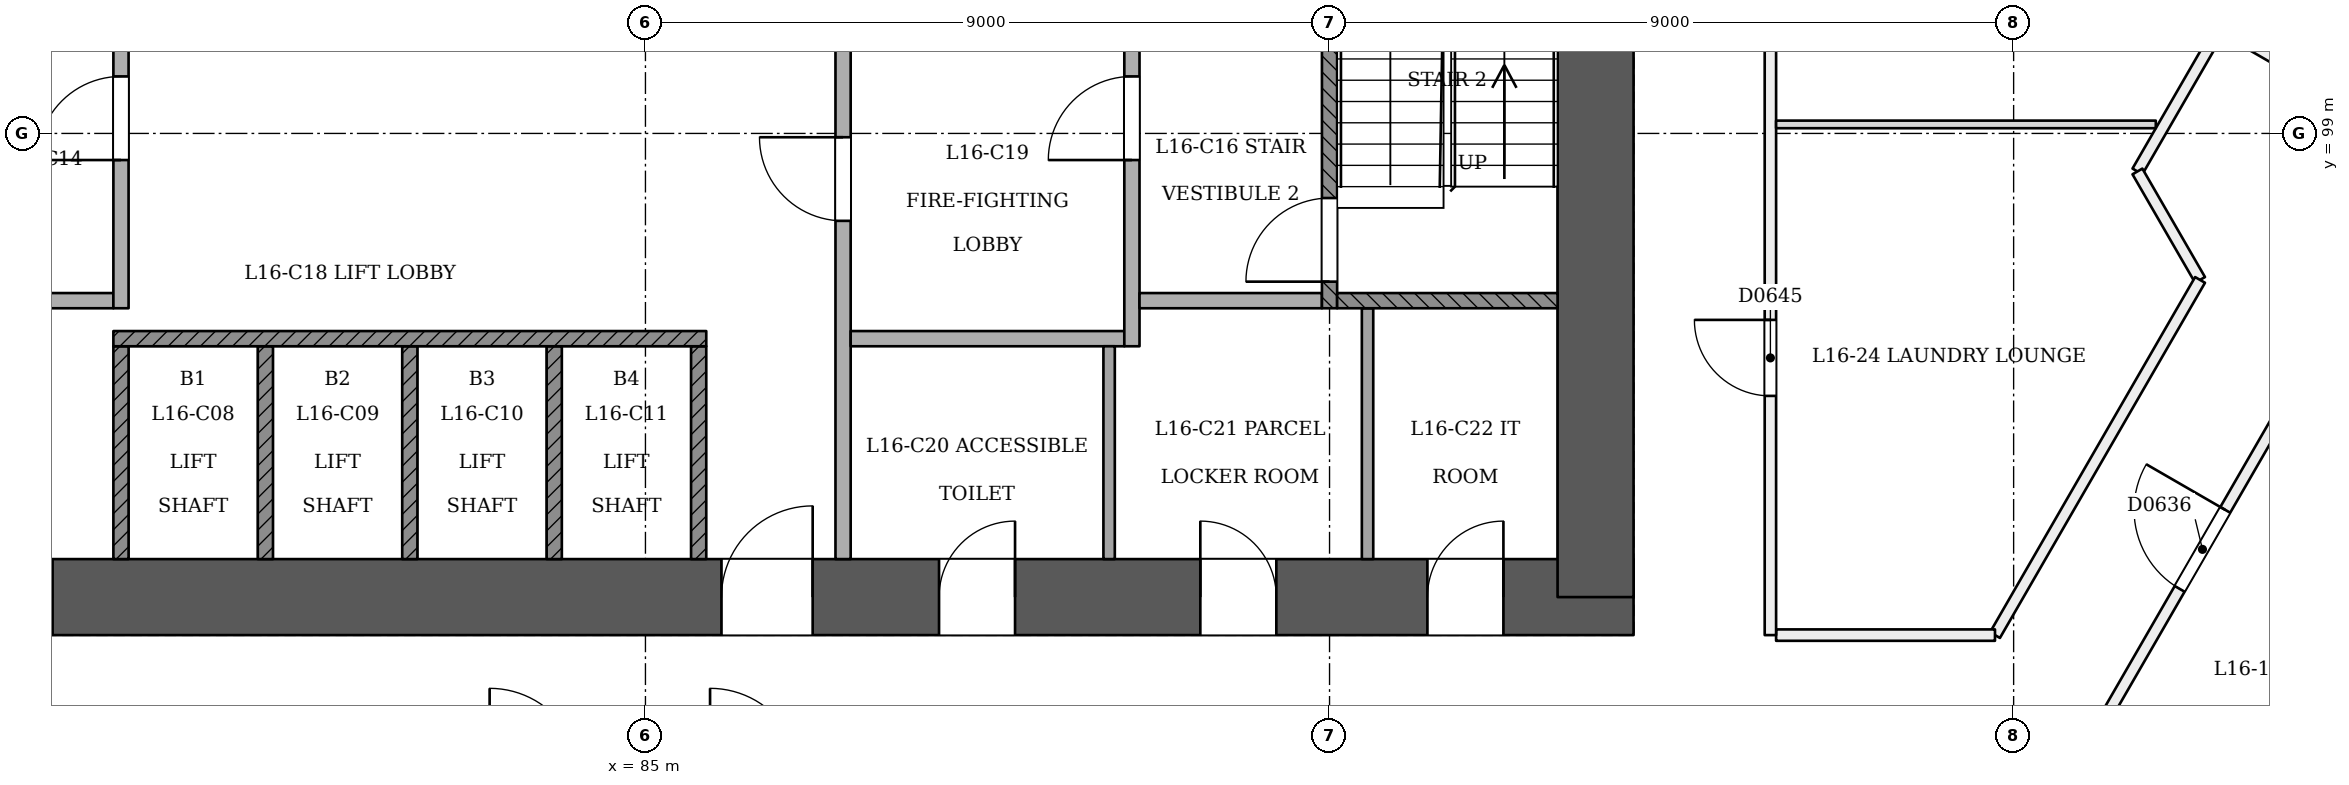
"""IFC4 building model, lengths in metres.
Left out: names, types, materials, properties, quantities, classifications, styles, units other than length and angle.
Written with IfcOpenShell. Run it as: python <this file> out.ifc"""

import sys

from ifc_helpers import new_model, si_unit, direction, frame, frame_2d, origin, place, context, subcontext, project, spatial, rectangle, extrude, element, fill, save


model = new_model("IFC4")
c1 = context("Model", 3, precision=1e-05, world=origin(), true_north=direction((0.0, 1.0)))
c2 = subcontext(c1, "Body", "Model", "MODEL_VIEW")
j1 = project(units=[si_unit("LENGTHUNIT", "METRE"), si_unit("PLANEANGLEUNIT", "RADIAN")], contexts=[c1])
p1 = place(None, origin())
s1 = spatial("IfcSite", under=j1, at=p1, CompositionType="ELEMENT")
p2 = place(p1, origin())
s2 = spatial("IfcBuilding", under=s1, at=p2, CompositionType="ELEMENT")
p3 = place(p2, frame((0.0, 0.0, 66.6)))
s3 = spatial("IfcBuildingStorey", under=s2, at=p3, CompositionType="ELEMENT", Elevation=66.6)
p4 = place(p3, frame((72.5, 92.9, 0.0), z_axis=(0.0, 0.0, 1.0), x_axis=(1.0, 0.0, 0.0)))
e1 = element("IfcWall", 1, at=p4, inside=s3, PredefinedType="SHEAR", context=c2, shape_type="SweptSolid", body=[
    extrude(rectangle(XDim=25.5, YDim=1.0, at=frame_2d((12.75, 0.0))), origin(), (0.0, 0.0, 1.0), 3.6),
])
p5 = place(p4, frame((1.3, 0.0, 0.0)))
e2 = element("IfcOpeningElement", 2, at=p5, cuts=e1, PredefinedType="OPENING", context=c2, shape_type="SweptSolid", body=[
    extrude(rectangle(XDim=1.2, YDim=2.1, at=frame_2d((0.6, 1.05))), frame((0.0, 0.51, 0.0), z_axis=(0.0, -1.0, 0.0), x_axis=(1.0, 0.0, 0.0)), (0.0, 0.0, 1.0), 1.021),
])
p6 = place(p4, frame((3.5, 0.0, 0.0)))
e3 = element("IfcOpeningElement", 3, at=p6, cuts=e1, PredefinedType="OPENING", context=c2, shape_type="SweptSolid", body=[
    extrude(rectangle(XDim=1.2, YDim=2.1, at=frame_2d((0.6, 1.05))), frame((0.0, 0.51, 0.0), z_axis=(0.0, -1.0, 0.0), x_axis=(1.0, 0.0, 0.0)), (0.0, 0.0, 1.0), 1.021),
])
p7 = place(p4, frame((13.5, 0.0, 0.0)))
e4 = element("IfcOpeningElement", 4, at=p7, cuts=e1, PredefinedType="OPENING", context=c2, shape_type="SweptSolid", body=[
    extrude(rectangle(XDim=1.2, YDim=2.1, at=frame_2d((0.6, 1.05))), frame((0.0, 0.51, 0.0), z_axis=(0.0, -1.0, 0.0), x_axis=(1.0, 0.0, 0.0)), (0.0, 0.0, 1.0), 1.021),
])
p8 = place(p4, frame((16.363, 0.0, 0.0)))
e5 = element("IfcOpeningElement", 5, at=p8, cuts=e1, PredefinedType="OPENING", context=c2, shape_type="SweptSolid", body=[
    extrude(rectangle(XDim=1.0, YDim=2.1, at=frame_2d((0.5, 1.05))), frame((0.0, 0.51, 0.0), z_axis=(0.0, -1.0, 0.0), x_axis=(1.0, 0.0, 0.0)), (0.0, 0.0, 1.0), 1.021),
])
p9 = place(p4, frame((19.8, 0.0, 0.0)))
e6 = element("IfcOpeningElement", 6, at=p9, cuts=e1, PredefinedType="OPENING", context=c2, shape_type="SweptSolid", body=[
    extrude(rectangle(XDim=1.0, YDim=2.1, at=frame_2d((0.5, 1.05))), frame((0.0, 0.51, 0.0), z_axis=(0.0, -1.0, 0.0), x_axis=(1.0, 0.0, 0.0)), (0.0, 0.0, 1.0), 1.021),
])
p10 = place(p4, frame((22.788, 0.0, 0.0)))
e7 = element("IfcOpeningElement", 7, at=p10, cuts=e1, PredefinedType="OPENING", context=c2, shape_type="SweptSolid", body=[
    extrude(rectangle(XDim=1.0, YDim=2.1, at=frame_2d((0.5, 1.05))), frame((0.0, 0.51, 0.0), z_axis=(0.0, -1.0, 0.0), x_axis=(1.0, 0.0, 0.0)), (0.0, 0.0, 1.0), 1.021),
])
p11 = place(p3, frame((97.5, 92.9, 0.0), z_axis=(0.0, 0.0, 1.0), x_axis=(0.0, 1.0, 0.0)))
e8 = element("IfcWall", 8, at=p11, inside=s3, PredefinedType="SHEAR", context=c2, shape_type="SweptSolid", body=[
    extrude(rectangle(XDim=11.5, YDim=1.0, at=frame_2d((5.75, 0.0))), origin(), (0.0, 0.0, 1.0), 3.6),
])
p12 = place(p3, frame((62.458, 97.093, 0.0), z_axis=(0.0, 0.0, 1.0), x_axis=(0.499998802074, -0.866026095406, 0.0)))
e9 = element("IfcWall", 9, at=p12, inside=s3, PredefinedType="PARTITIONING", context=c2, shape_type="SweptSolid", body=[
    extrude(rectangle(XDim=43.437, YDim=0.15, at=frame_2d((21.719, 0.0))), origin(), (0.0, 0.0, 1.0), 2.7),
])
p13 = place(p12, frame((0.286, 0.0, 0.0)))
e10 = element("IfcOpeningElement", 10, at=p13, cuts=e9, PredefinedType="OPENING", context=c2, shape_type="SweptSolid", body=[
    extrude(rectangle(XDim=1.2, YDim=2.1, at=frame_2d((0.6, 1.05))), frame((0.0, 0.085, 0.0), z_axis=(0.0, -1.0, 0.0), x_axis=(1.0, 0.0, 0.0)), (0.0, 0.0, 1.0), 0.171),
])
p14 = place(p12, frame((12.13, 0.0, 0.0)))
e11 = element("IfcOpeningElement", 11, at=p14, cuts=e9, PredefinedType="OPENING", context=c2, shape_type="SweptSolid", body=[
    extrude(rectangle(XDim=1.2, YDim=2.1, at=frame_2d((0.6, 1.05))), frame((0.0, 0.085, 0.0), z_axis=(0.0, -1.0, 0.0), x_axis=(1.0, 0.0, 0.0)), (0.0, 0.0, 1.0), 0.171),
])
p15 = place(p12, frame((18.98, 0.0, 0.0)))
e12 = element("IfcOpeningElement", 12, at=p15, cuts=e9, PredefinedType="OPENING", context=c2, shape_type="SweptSolid", body=[
    extrude(rectangle(XDim=1.0, YDim=2.1, at=frame_2d((0.5, 1.05))), frame((0.0, 0.085, 0.0), z_axis=(0.0, -1.0, 0.0), x_axis=(1.0, 0.0, 0.0)), (0.0, 0.0, 1.0), 0.171),
])
p16 = place(p12, frame((27.88, 0.0, 0.0)))
e13 = element("IfcOpeningElement", 13, at=p16, cuts=e9, PredefinedType="OPENING", context=c2, shape_type="SweptSolid", body=[
    extrude(rectangle(XDim=1.2, YDim=2.1, at=frame_2d((0.6, 1.05))), frame((0.0, 0.085, 0.0), z_axis=(0.0, -1.0, 0.0), x_axis=(1.0, 0.0, 0.0)), (0.0, 0.0, 1.0), 0.171),
])
p17 = place(p12, frame((38.745, 0.0, 0.0)))
e14 = element("IfcOpeningElement", 14, at=p17, cuts=e9, PredefinedType="OPENING", context=c2, shape_type="SweptSolid", body=[
    extrude(rectangle(XDim=1.2, YDim=2.1, at=frame_2d((0.6, 1.05))), frame((0.0, 0.085, 0.0), z_axis=(0.0, -1.0, 0.0), x_axis=(1.0, 0.0, 0.0)), (0.0, 0.0, 1.0), 0.171),
])
p18 = place(p3, frame((85.824, 59.475, 0.0), z_axis=(0.0, 0.0, 1.0), x_axis=(0.499998498473, 0.86602627069, 0.0)))
e15 = element("IfcWall", 15, at=p18, inside=s3, PredefinedType="PARTITIONING", context=c2, shape_type="SweptSolid", body=[
    extrude(rectangle(XDim=42.924, YDim=0.15, at=frame_2d((21.462, 0.0))), origin(), (0.0, 0.0, 1.0), 2.7),
])
p19 = place(p18, frame((3.492, 0.0, 0.0)))
e16 = element("IfcOpeningElement", 16, at=p19, cuts=e15, PredefinedType="OPENING", context=c2, shape_type="SweptSolid", body=[
    extrude(rectangle(XDim=1.2, YDim=2.1, at=frame_2d((0.6, 1.05))), frame((0.0, 0.085, 0.0), z_axis=(0.0, -1.0, 0.0), x_axis=(1.0, 0.0, 0.0)), (0.0, 0.0, 1.0), 0.171),
])
p20 = place(p18, frame((14.357, 0.0, 0.0)))
e17 = element("IfcOpeningElement", 17, at=p20, cuts=e15, PredefinedType="OPENING", context=c2, shape_type="SweptSolid", body=[
    extrude(rectangle(XDim=1.2, YDim=2.1, at=frame_2d((0.6, 1.05))), frame((0.0, 0.085, 0.0), z_axis=(0.0, -1.0, 0.0), x_axis=(1.0, 0.0, 0.0)), (0.0, 0.0, 1.0), 0.171),
])
p21 = place(p18, frame((27.857, 0.0, 0.0)))
e18 = element("IfcOpeningElement", 18, at=p21, cuts=e15, PredefinedType="OPENING", context=c2, shape_type="SweptSolid", body=[
    extrude(rectangle(XDim=1.2, YDim=2.1, at=frame_2d((0.6, 1.05))), frame((0.0, 0.085, 0.0), z_axis=(0.0, -1.0, 0.0), x_axis=(1.0, 0.0, 0.0)), (0.0, 0.0, 1.0), 0.171),
])
p22 = place(p18, frame((38.721, 0.0, 0.0)))
e19 = element("IfcOpeningElement", 19, at=p22, cuts=e15, PredefinedType="OPENING", context=c2, shape_type="SweptSolid", body=[
    extrude(rectangle(XDim=1.2, YDim=2.1, at=frame_2d((0.6, 1.05))), frame((0.0, 0.085, 0.0), z_axis=(0.0, -1.0, 0.0), x_axis=(1.0, 0.0, 0.0)), (0.0, 0.0, 1.0), 0.171),
])
p23 = place(p3, frame((107.284, 99.5, 0.0), z_axis=(0.0, 0.0, 1.0), x_axis=(-0.866013532718, 0.500020560727, 0.0)))
e20 = element("IfcWall", 20, at=p23, inside=s3, PredefinedType="PARTITIONING", context=c2, shape_type="SweptSolid", body=[
    extrude(rectangle(XDim=1.725, YDim=0.15, at=frame_2d((0.863, 0.0))), origin(), (0.0, 0.0, 1.0), 3.1),
])
p24 = place(p3, frame((105.726, 100.4, 0.0), z_axis=(0.0, 0.0, 1.0), x_axis=(-0.500005024956, -0.866022502605, 0.0)))
e21 = element("IfcWall", 21, at=p24, inside=s3, PredefinedType="PARTITIONING", context=c2, shape_type="SweptSolid", body=[
    extrude(rectangle(XDim=2.194, YDim=0.15, at=frame_2d((1.097, 0.0))), origin(), (0.0, 0.0, 1.0), 3.1),
])
p25 = place(p3, frame((104.629, 98.5, 0.0), z_axis=(0.0, 0.0, 1.0), x_axis=(0.500043078269, -0.866000531106, 0.0)))
e22 = element("IfcWall", 22, at=p25, inside=s3, PredefinedType="PARTITIONING", context=c2, shape_type="SweptSolid", body=[
    extrude(rectangle(XDim=1.648, YDim=0.15, at=frame_2d((0.824, 0.0))), origin(), (0.0, 0.0, 1.0), 3.1),
])
p26 = place(p3, frame((105.453, 97.073, 0.0), z_axis=(0.0, 0.0, 1.0), x_axis=(-0.499997913005, -0.866026608708, 0.0)))
e23 = element("IfcWall", 23, at=p26, inside=s3, PredefinedType="PARTITIONING", context=c2, shape_type="SweptSolid", body=[
    extrude(rectangle(XDim=5.396, YDim=0.15, at=frame_2d((2.698, 0.0))), origin(), (0.0, 0.0, 1.0), 3.1),
])
p27 = place(p3, frame((102.755, 92.4, 0.0), z_axis=(0.0, 0.0, 1.0), x_axis=(-1.0, 0.0, 0.0)))
e24 = element("IfcWall", 24, at=p27, inside=s3, PredefinedType="PARTITIONING", context=c2, shape_type="SweptSolid", body=[
    extrude(rectangle(XDim=2.88, YDim=0.15, at=frame_2d((1.44, 0.0))), origin(), (0.0, 0.0, 1.0), 3.1),
])
p28 = place(p3, frame((99.8, 92.4, 0.0), z_axis=(0.0, 0.0, 1.0), x_axis=(0.0, 1.0, 0.0)))
e25 = element("IfcWall", 25, at=p28, inside=s3, PredefinedType="PARTITIONING", context=c2, shape_type="SweptSolid", body=[
    extrude(rectangle(XDim=11.5, YDim=0.15, at=frame_2d((5.75, 0.0))), origin(), (0.0, 0.0, 1.0), 2.6),
])
p29 = place(p28, frame((7.884, 0.0, 0.0)))
e26 = element("IfcOpeningElement", 26, at=p29, cuts=e25, PredefinedType="OPENING", context=c2, shape_type="SweptSolid", body=[
    extrude(rectangle(XDim=1.2, YDim=2.1, at=frame_2d((0.6, 1.05))), frame((0.0, 0.085, 0.0), z_axis=(0.0, -1.0, 0.0), x_axis=(1.0, 0.0, 0.0)), (0.0, 0.0, 1.0), 0.171),
])
p30 = place(p28, frame((3.147, 0.0, 0.0)))
e27 = element("IfcOpeningElement", 27, at=p30, cuts=e25, PredefinedType="OPENING", context=c2, shape_type="SweptSolid", body=[
    extrude(rectangle(XDim=1.0, YDim=2.1, at=frame_2d((0.5, 1.05))), frame((0.0, 0.085, 0.0), z_axis=(0.0, -1.0, 0.0), x_axis=(1.0, 0.0, 0.0)), (0.0, 0.0, 1.0), 0.171),
])
p31 = place(p3, frame((99.875, 99.119, 0.0), z_axis=(0.0, 0.0, 1.0), x_axis=(1.0, 0.0, 0.0)))
e28 = element("IfcWall", 28, at=p31, inside=s3, PredefinedType="PARTITIONING", context=c2, shape_type="SweptSolid", body=[
    extrude(rectangle(XDim=4.995, YDim=0.1, at=frame_2d((2.498, 0.0))), origin(), (0.0, 0.0, 1.0), 3.1),
])
for number, where, z_axis, x_axis in (
    (29, (78.1, 93.4, 0.0), (0.0, 0.0, 1.0), (0.0, 1.0, 0.0)),
    (30, (80.0, 93.4, 0.0), (0.0, 0.0, 1.0), (0.0, 1.0, 0.0)),
    (31, (81.9, 93.4, 0.0), (0.0, 0.0, 1.0), (0.0, 1.0, 0.0)),
    (32, (83.8, 93.4, 0.0), (0.0, 0.0, 1.0), (0.0, 1.0, 0.0)),
    (33, (85.7, 93.4, 0.0), (0.0, 0.0, 1.0), (0.0, 1.0, 0.0)),
):
    element("IfcWall", number, at=place(p3, frame(where, z_axis=z_axis, x_axis=x_axis)), inside=s3, PredefinedType="SOLIDWALL", context=c2, shape_type="SweptSolid", body=[
        extrude(rectangle(XDim=2.8, YDim=0.2, at=frame_2d((1.4, 0.0))), origin(), (0.0, 0.0, 1.0), 3.1),
    ])
p32 = place(p3, frame((87.6, 93.4, 0.0), z_axis=(0.0, 0.0, 1.0), x_axis=(0.0, 1.0, 0.0)))
e34 = element("IfcWall", 34, at=p32, inside=s3, PredefinedType="PARTITIONING", context=c2, shape_type="SweptSolid", body=[
    extrude(rectangle(XDim=7.0, YDim=0.2, at=frame_2d((3.5, 0.0))), origin(), (0.0, 0.0, 1.0), 3.1),
])
p33 = place(p32, frame((4.45, 0.0, 0.0)))
e35 = element("IfcOpeningElement", 35, at=p33, cuts=e34, PredefinedType="OPENING", context=c2, shape_type="SweptSolid", body=[
    extrude(rectangle(XDim=1.1, YDim=2.1, at=frame_2d((0.55, 1.05))), frame((0.0, 0.11, 0.0), z_axis=(0.0, -1.0, 0.0), x_axis=(1.0, 0.0, 0.0)), (0.0, 0.0, 1.0), 0.221),
])
p34 = place(p3, frame((91.1, 93.4, 0.0), z_axis=(0.0, 0.0, 1.0), x_axis=(0.0, 1.0, 0.0)))
e36 = element("IfcWall", 36, at=p34, inside=s3, PredefinedType="PARTITIONING", context=c2, shape_type="SweptSolid", body=[
    extrude(rectangle(XDim=2.8, YDim=0.15, at=frame_2d((1.4, 0.0))), origin(), (0.0, 0.0, 1.0), 3.1),
])
p35 = place(p3, frame((94.5, 93.4, 0.0), z_axis=(0.0, 0.0, 1.0), x_axis=(0.0, 1.0, 0.0)))
e37 = element("IfcWall", 37, at=p35, inside=s3, PredefinedType="PARTITIONING", context=c2, shape_type="SweptSolid", body=[
    extrude(rectangle(XDim=3.3, YDim=0.15, at=frame_2d((1.65, 0.0))), origin(), (0.0, 0.0, 1.0), 3.1),
])
p36 = place(p3, frame((78.0, 96.3, 0.0), z_axis=(0.0, 0.0, 1.0), x_axis=(1.0, 0.0, 0.0)))
e38 = element("IfcWall", 38, at=p36, inside=s3, PredefinedType="SOLIDWALL", context=c2, shape_type="SweptSolid", body=[
    extrude(rectangle(XDim=7.8, YDim=0.2, at=frame_2d((3.9, 0.0))), origin(), (0.0, 0.0, 1.0), 3.1),
])
p37 = place(p3, frame((87.7, 96.3, 0.0), z_axis=(0.0, 0.0, 1.0), x_axis=(1.0, 0.0, 0.0)))
e39 = element("IfcWall", 39, at=p37, inside=s3, PredefinedType="PARTITIONING", context=c2, shape_type="SweptSolid", body=[
    extrude(rectangle(XDim=3.6, YDim=0.2, at=frame_2d((1.8, 0.0))), origin(), (0.0, 0.0, 1.0), 3.1),
])
p38 = place(p3, frame((91.4, 96.2, 0.0), z_axis=(0.0, 0.0, 1.0), x_axis=(0.0, 1.0, 0.0)))
e40 = element("IfcWall", 40, at=p38, inside=s3, PredefinedType="PARTITIONING", context=c2, shape_type="SweptSolid", body=[
    extrude(rectangle(XDim=4.2, YDim=0.2, at=frame_2d((2.1, 0.0))), origin(), (0.0, 0.0, 1.0), 3.1),
])
p39 = place(p38, frame((2.45, 0.0, 0.0)))
e41 = element("IfcOpeningElement", 41, at=p39, cuts=e40, PredefinedType="OPENING", context=c2, shape_type="SweptSolid", body=[
    extrude(rectangle(XDim=1.1, YDim=2.1, at=frame_2d((0.55, 1.05))), frame((0.0, 0.11, 0.0), z_axis=(0.0, -1.0, 0.0), x_axis=(1.0, 0.0, 0.0)), (0.0, 0.0, 1.0), 0.221),
])
p40 = place(p3, frame((76.1, 96.8, 0.0), z_axis=(0.0, 0.0, 1.0), x_axis=(1.0, 0.0, 0.0)))
e42 = element("IfcWall", 42, at=p40, inside=s3, PredefinedType="PARTITIONING", context=c2, shape_type="SweptSolid", body=[
    extrude(rectangle(XDim=1.9, YDim=0.2, at=frame_2d((0.95, 0.0))), origin(), (0.0, 0.0, 1.0), 3.1),
])
p41 = place(p3, frame((78.1, 96.7, 0.0), z_axis=(0.0, 0.0, 1.0), x_axis=(0.0, 1.0, 0.0)))
e43 = element("IfcWall", 43, at=p41, inside=s3, PredefinedType="PARTITIONING", context=c2, shape_type="SweptSolid", body=[
    extrude(rectangle(XDim=3.7, YDim=0.2, at=frame_2d((1.85, 0.0))), origin(), (0.0, 0.0, 1.0), 3.1),
])
p42 = place(p41, frame((1.95, 0.0, 0.0)))
e44 = element("IfcOpeningElement", 44, at=p42, cuts=e43, PredefinedType="OPENING", context=c2, shape_type="SweptSolid", body=[
    extrude(rectangle(XDim=1.1, YDim=2.1, at=frame_2d((0.55, 1.05))), frame((0.0, 0.11, 0.0), z_axis=(0.0, -1.0, 0.0), x_axis=(1.0, 0.0, 0.0)), (0.0, 0.0, 1.0), 0.221),
])
p43 = place(p3, frame((91.5, 96.8, 0.0), z_axis=(0.0, 0.0, 1.0), x_axis=(1.0, 0.0, 0.0)))
e45 = element("IfcWall", 45, at=p43, inside=s3, PredefinedType="PARTITIONING", context=c2, shape_type="SweptSolid", body=[
    extrude(rectangle(XDim=2.4, YDim=0.2, at=frame_2d((1.2, 0.0))), origin(), (0.0, 0.0, 1.0), 3.1),
])
p44 = place(p3, frame((94.0, 96.7, 0.0), z_axis=(0.0, 0.0, 1.0), x_axis=(0.0, 1.0, 0.0)))
e46 = element("IfcWall", 46, at=p44, inside=s3, PredefinedType="SOLIDWALL", context=c2, shape_type="SweptSolid", body=[
    extrude(rectangle(XDim=3.7, YDim=0.2, at=frame_2d((1.85, 0.0))), origin(), (0.0, 0.0, 1.0), 3.1),
])
p45 = place(p44, frame((0.35, 0.0, 0.0)))
e47 = element("IfcOpeningElement", 47, at=p45, cuts=e46, PredefinedType="OPENING", context=c2, shape_type="SweptSolid", body=[
    extrude(rectangle(XDim=1.1, YDim=2.1, at=frame_2d((0.55, 1.05))), frame((0.0, 0.11, 0.0), z_axis=(0.0, -1.0, 0.0), x_axis=(1.0, 0.0, 0.0)), (0.0, 0.0, 1.0), 0.221),
])
p46 = place(p3, frame((94.1, 96.8, 0.0), z_axis=(0.0, 0.0, 1.0), x_axis=(1.0, 0.0, 0.0)))
e48 = element("IfcWall", 48, at=p46, inside=s3, PredefinedType="SOLIDWALL", context=c2, shape_type="SweptSolid", body=[
    extrude(rectangle(XDim=2.9, YDim=0.2, at=frame_2d((1.45, 0.0))), origin(), (0.0, 0.0, 1.0), 3.1),
])
p47 = place(p22, origin())
e49 = element("IfcDoor", 49, at=p47, inside=s3, OperationType="SINGLE_SWING_RIGHT", PredefinedType="NOTDEFINED", context=c2, shape_type="SweptSolid", body=[
    extrude(rectangle(XDim=1.2, YDim=2.1, at=frame_2d((0.6, 1.05))), frame((0.0, 0.025, 0.0), z_axis=(0.0, -1.0, 0.0), x_axis=(1.0, 0.0, 0.0)), (0.0, 0.0, 1.0), 0.05),
])
fill(e19, e49)
p48 = place(p30, origin())
e50 = element("IfcDoor", 50, at=p48, inside=s3, OperationType="SINGLE_SWING_RIGHT", PredefinedType="NOTDEFINED", context=c2, shape_type="SweptSolid", body=[
    extrude(rectangle(XDim=1.0, YDim=2.1, at=frame_2d((0.5, 1.05))), frame((0.0, 0.025, 0.0), z_axis=(0.0, -1.0, 0.0), x_axis=(1.0, 0.0, 0.0)), (0.0, 0.0, 1.0), 0.05),
])
fill(e27, e50)
p49 = place(p45, origin())
e51 = element("IfcDoor", 51, at=p49, inside=s3, OperationType="SINGLE_SWING_LEFT", PredefinedType="NOTDEFINED", context=c2, shape_type="SweptSolid", body=[
    extrude(rectangle(XDim=1.1, YDim=2.1, at=frame_2d((0.55, 1.05))), frame((0.0, 0.025, 0.0), z_axis=(0.0, -1.0, 0.0), x_axis=(1.0, 0.0, 0.0)), (0.0, 0.0, 1.0), 0.05),
])
fill(e47, e51)
p50 = place(p42, origin())
e52 = element("IfcDoor", 52, at=p50, inside=s3, OperationType="SINGLE_SWING_LEFT", PredefinedType="NOTDEFINED", context=c2, shape_type="SweptSolid", body=[
    extrude(rectangle(XDim=1.1, YDim=2.1, at=frame_2d((0.55, 1.05))), frame((0.0, 0.025, 0.0), z_axis=(0.0, -1.0, 0.0), x_axis=(1.0, 0.0, 0.0)), (0.0, 0.0, 1.0), 0.05),
])
fill(e44, e52)
p51 = place(p33, origin())
e53 = element("IfcDoor", 53, at=p51, inside=s3, OperationType="SINGLE_SWING_RIGHT", PredefinedType="NOTDEFINED", context=c2, shape_type="SweptSolid", body=[
    extrude(rectangle(XDim=1.1, YDim=2.1, at=frame_2d((0.55, 1.05))), frame((0.0, 0.025, 0.0), z_axis=(0.0, -1.0, 0.0), x_axis=(1.0, 0.0, 0.0)), (0.0, 0.0, 1.0), 0.05),
])
fill(e35, e53)
p52 = place(p39, origin())
e54 = element("IfcDoor", 54, at=p52, inside=s3, OperationType="SINGLE_SWING_LEFT", PredefinedType="NOTDEFINED", context=c2, shape_type="SweptSolid", body=[
    extrude(rectangle(XDim=1.1, YDim=2.1, at=frame_2d((0.55, 1.05))), frame((0.0, 0.025, 0.0), z_axis=(0.0, -1.0, 0.0), x_axis=(1.0, 0.0, 0.0)), (0.0, 0.0, 1.0), 0.05),
])
fill(e41, e54)
p53 = place(p6, origin())
e55 = element("IfcDoor", 55, at=p53, inside=s3, OperationType="SINGLE_SWING_LEFT", PredefinedType="NOTDEFINED", context=c2, shape_type="SweptSolid", body=[
    extrude(rectangle(XDim=1.2, YDim=2.1, at=frame_2d((0.6, 1.05))), frame((0.0, 0.025, 0.0), z_axis=(0.0, -1.0, 0.0), x_axis=(1.0, 0.0, 0.0)), (0.0, 0.0, 1.0), 0.05),
])
fill(e3, e55)
p54 = place(p7, origin())
e56 = element("IfcDoor", 56, at=p54, inside=s3, OperationType="SINGLE_SWING_RIGHT", PredefinedType="NOTDEFINED", context=c2, shape_type="SweptSolid", body=[
    extrude(rectangle(XDim=1.2, YDim=2.1, at=frame_2d((0.6, 1.05))), frame((0.0, 0.025, 0.0), z_axis=(0.0, -1.0, 0.0), x_axis=(1.0, 0.0, 0.0)), (0.0, 0.0, 1.0), 0.05),
])
fill(e4, e56)
p55 = place(p8, origin())
e57 = element("IfcDoor", 57, at=p55, inside=s3, OperationType="SINGLE_SWING_RIGHT", PredefinedType="NOTDEFINED", context=c2, shape_type="SweptSolid", body=[
    extrude(rectangle(XDim=1.0, YDim=2.1, at=frame_2d((0.5, 1.05))), frame((0.0, 0.025, 0.0), z_axis=(0.0, -1.0, 0.0), x_axis=(1.0, 0.0, 0.0)), (0.0, 0.0, 1.0), 0.05),
])
fill(e5, e57)
p56 = place(p9, origin())
e58 = element("IfcDoor", 58, at=p56, inside=s3, OperationType="SINGLE_SWING_LEFT", PredefinedType="NOTDEFINED", context=c2, shape_type="SweptSolid", body=[
    extrude(rectangle(XDim=1.0, YDim=2.1, at=frame_2d((0.5, 1.05))), frame((0.0, 0.025, 0.0), z_axis=(0.0, -1.0, 0.0), x_axis=(1.0, 0.0, 0.0)), (0.0, 0.0, 1.0), 0.05),
])
fill(e6, e58)
p57 = place(p10, origin())
e59 = element("IfcDoor", 59, at=p57, inside=s3, OperationType="SINGLE_SWING_RIGHT", PredefinedType="NOTDEFINED", context=c2, shape_type="SweptSolid", body=[
    extrude(rectangle(XDim=1.0, YDim=2.1, at=frame_2d((0.5, 1.05))), frame((0.0, 0.025, 0.0), z_axis=(0.0, -1.0, 0.0), x_axis=(1.0, 0.0, 0.0)), (0.0, 0.0, 1.0), 0.05),
])
fill(e7, e59)
save(model, sys.argv[1])
